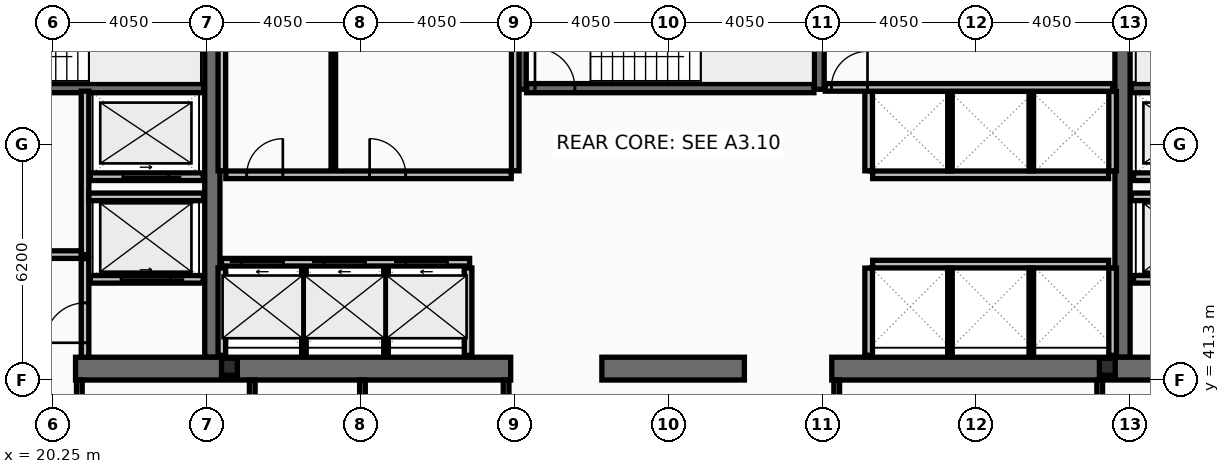
"""IFC4 building model, lengths in metres.
Left out: names, types, materials, properties, quantities, classifications, styles, units other than length and angle.
Written with IfcOpenShell. Run it as: python <this file> out.ifc"""

import sys

from ifc_helpers import new_model, si_unit, direction, frame, frame_2d, origin, origin_2d, place, context, subcontext, project, spatial, rectangle, i_section, extrude, element, fill, save


model = new_model("IFC4")
c1 = context("Model", 3, precision=1e-05, world=origin(), true_north=direction((0.0, 1.0)))
c2 = subcontext(c1, "Body", "Model", "MODEL_VIEW")
j1 = project(units=[si_unit("LENGTHUNIT", "METRE"), si_unit("PLANEANGLEUNIT", "RADIAN")], contexts=[c1])
p1 = place(None, origin())
s1 = spatial("IfcSite", under=j1, at=p1, CompositionType="ELEMENT")
p2 = place(p1, origin())
s2 = spatial("IfcBuilding", under=s1, at=p2, CompositionType="ELEMENT")
p3 = place(p2, frame((0.0, 0.0, 180.6)))
s3 = spatial("IfcBuildingStorey", under=s2, at=p3, CompositionType="ELEMENT", Elevation=180.6)
for number, where, z_axis, x_axis in (
    (1, (24.45, 41.9, 0.0), (0.0, 0.0, 1.0), (0.0, 1.0, 0.0)),
    (2, (48.4, 41.9, 0.0), (0.0, 0.0, 1.0), (0.0, 1.0, 0.0)),
):
    element("IfcWall", number, at=place(p3, frame(where, z_axis=z_axis, x_axis=x_axis)), inside=s3, PredefinedType="SHEAR", context=c2, shape_type="SweptSolid", body=[
        extrude(rectangle(XDim=11.2, YDim=0.4, at=frame_2d((5.6, 0.0))), origin(), (0.0, 0.0, 1.0), 3.4),
    ])
p4 = place(p3, frame((32.3, 41.6, 0.0), z_axis=(0.0, 0.0, 1.0), x_axis=(-1.0, 0.0, 0.0)))
e3 = element("IfcWall", 3, at=p4, inside=s3, PredefinedType="SHEAR", context=c2, shape_type="SweptSolid", body=[
    extrude(rectangle(XDim=11.45, YDim=0.6, at=frame_2d((5.725, 0.0))), origin(), (0.0, 0.0, 1.0), 3.4),
])
p5 = place(p3, frame((38.45, 41.6, 0.0), z_axis=(0.0, 0.0, 1.0), x_axis=(-1.0, 0.0, 0.0)))
e4 = element("IfcWall", 4, at=p5, inside=s3, PredefinedType="SHEAR", context=c2, shape_type="SweptSolid", body=[
    extrude(rectangle(XDim=3.75, YDim=0.6, at=frame_2d((1.875, 0.0))), origin(), (0.0, 0.0, 1.0), 3.4),
])
p6 = place(p3, frame((52.05, 41.6, 0.0), z_axis=(0.0, 0.0, 1.0), x_axis=(-1.0, 0.0, 0.0)))
e5 = element("IfcWall", 5, at=p6, inside=s3, PredefinedType="SHEAR", context=c2, shape_type="SweptSolid", body=[
    extrude(rectangle(XDim=11.3, YDim=0.6, at=frame_2d((5.65, 0.0))), origin(), (0.0, 0.0, 1.0), 3.4),
])
for number, where, z_axis, x_axis in (
    (6, (32.58, 48.95, 0.0), (0.0, 0.0, 1.0), (0.0, 1.0, 0.0)),
    (7, (40.42, 48.95, 0.0), (0.0, 0.0, 1.0), (0.0, 1.0, 0.0)),
):
    element("IfcWall", number, at=place(p3, frame(where, z_axis=z_axis, x_axis=x_axis)), inside=s3, PredefinedType="SHEAR", context=c2, shape_type="SweptSolid", body=[
        extrude(rectangle(XDim=4.15, YDim=0.26, at=frame_2d((2.075, 0.0))), origin(), (0.0, 0.0, 1.0), 3.4),
    ])
p7 = place(p3, frame((16.8, 48.98, 0.0), z_axis=(0.0, 0.0, 1.0), x_axis=(1.0, 0.0, 0.0)))
e8 = element("IfcWall", 8, at=p7, inside=s3, PredefinedType="SHEAR", context=c2, shape_type="SweptSolid", body=[
    extrude(rectangle(XDim=7.42, YDim=0.24, at=frame_2d((3.71, 0.0))), origin(), (0.0, 0.0, 1.0), 3.4),
])
p8 = place(p7, frame((0.22, 0.0, 0.0)))
e9 = element("IfcOpeningElement", 9, at=p8, cuts=e8, PredefinedType="OPENING", context=c2, shape_type="SweptSolid", body=[
    extrude(rectangle(XDim=1.05, YDim=2.15, at=frame_2d((0.525, 1.075))), frame((0.0, 0.13, 0.0), z_axis=(0.0, -1.0, 0.0), x_axis=(1.0, 0.0, 0.0)), (0.0, 0.0, 1.0), 0.26),
])
p9 = place(p3, frame((48.63, 48.98, 0.0), z_axis=(0.0, 0.0, 1.0), x_axis=(1.0, 0.0, 0.0)))
e10 = element("IfcWall", 10, at=p9, inside=s3, PredefinedType="SHEAR", context=c2, shape_type="SweptSolid", body=[
    extrude(rectangle(XDim=7.47, YDim=0.24, at=frame_2d((3.735, 0.0))), origin(), (0.0, 0.0, 1.0), 3.4),
])
p10 = place(p9, frame((6.2, 0.0, 0.0)))
e11 = element("IfcOpeningElement", 11, at=p10, cuts=e10, PredefinedType="OPENING", context=c2, shape_type="SweptSolid", body=[
    extrude(rectangle(XDim=1.05, YDim=2.15, at=frame_2d((0.525, 1.075))), frame((0.0, 0.13, 0.0), z_axis=(0.0, -1.0, 0.0), x_axis=(1.0, 0.0, 0.0)), (0.0, 0.0, 1.0), 0.26),
])
p11 = place(p3, frame((32.72, 48.98, 0.0), z_axis=(0.0, 0.0, 1.0), x_axis=(1.0, 0.0, 0.0)))
e12 = element("IfcWall", 12, at=p11, inside=s3, PredefinedType="SHEAR", context=c2, shape_type="SweptSolid", body=[
    extrude(rectangle(XDim=7.56, YDim=0.24, at=frame_2d((3.78, 0.0))), origin(), (0.0, 0.0, 1.0), 3.4),
])
p12 = place(p11, frame((0.22, 0.0, 0.0)))
e13 = element("IfcOpeningElement", 13, at=p12, cuts=e12, PredefinedType="OPENING", context=c2, shape_type="SweptSolid", body=[
    extrude(rectangle(XDim=1.05, YDim=2.15, at=frame_2d((0.525, 1.075))), frame((0.0, 0.13, 0.0), z_axis=(0.0, -1.0, 0.0), x_axis=(1.0, 0.0, 0.0)), (0.0, 0.0, 1.0), 0.26),
])
for number, where, z_axis, x_axis in (
    (14, (24.9, 41.65, 0.0), (0.0, 0.0, 1.0), (1.0, 0.0, 0.0)),
    (15, (48.0, 41.65, 0.0), (0.0, 0.0, 1.0), (1.0, 0.0, 0.0)),
):
    element("IfcColumn", number, at=place(p3, frame(where, z_axis=z_axis, x_axis=x_axis)), inside=s3, PredefinedType="COLUMN", context=c2, shape_type="SweptSolid", body=[
        extrude(i_section(OverallWidth=0.416, OverallDepth=0.446, WebThickness=0.039, FlangeThickness=0.063, at=origin_2d()), origin(), (0.0, 0.0, 1.0), 3.6),
    ])
p13 = place(p3, frame((24.69, 44.4, 0.0), z_axis=(0.0, 0.0, 1.0), x_axis=(1.0, 0.0, 0.0)))
e16 = element("IfcWall", 16, at=p13, inside=s3, PredefinedType="PARTITIONING", context=c2, shape_type="SweptSolid", body=[
    extrude(rectangle(XDim=6.53, YDim=0.2, at=frame_2d((3.265, 0.0))), origin(), (0.0, 0.0, 1.0), 3.4),
])
p14 = place(p13, frame((0.53, 0.0, 0.0)))
e17 = element("IfcOpeningElement", 17, at=p14, cuts=e16, PredefinedType="OPENING", context=c2, shape_type="SweptSolid", body=[
    extrude(rectangle(XDim=1.1, YDim=2.18, at=frame_2d((0.55, 1.09))), frame((0.0, 0.11, 0.0), z_axis=(0.0, -1.0, 0.0), x_axis=(1.0, 0.0, 0.0)), (0.0, 0.0, 1.0), 0.22),
])
p15 = place(p13, frame((2.69, 0.0, 0.0)))
e18 = element("IfcOpeningElement", 18, at=p15, cuts=e16, PredefinedType="OPENING", context=c2, shape_type="SweptSolid", body=[
    extrude(rectangle(XDim=1.1, YDim=2.18, at=frame_2d((0.55, 1.09))), frame((0.0, 0.11, 0.0), z_axis=(0.0, -1.0, 0.0), x_axis=(1.0, 0.0, 0.0)), (0.0, 0.0, 1.0), 0.22),
])
p16 = place(p13, frame((4.85, 0.0, 0.0)))
e19 = element("IfcOpeningElement", 19, at=p16, cuts=e16, PredefinedType="OPENING", context=c2, shape_type="SweptSolid", body=[
    extrude(rectangle(XDim=1.1, YDim=2.18, at=frame_2d((0.55, 1.09))), frame((0.0, 0.11, 0.0), z_axis=(0.0, -1.0, 0.0), x_axis=(1.0, 0.0, 0.0)), (0.0, 0.0, 1.0), 0.22),
])
p17 = place(p3, frame((51.61, 43.95, 0.0), z_axis=(0.0, 0.0, 1.0), x_axis=(-1.0, 0.0, 0.0)))
e20 = element("IfcWall", 20, at=p17, inside=s3, PredefinedType="PARTITIONING", context=c2, shape_type="SweptSolid", body=[
    extrude(rectangle(XDim=2.92, YDim=0.2, at=frame_2d((1.46, 0.0))), origin(), (0.0, 0.0, 1.0), 3.4),
])
p18 = place(p17, frame((0.81, 0.0, 0.0)))
e21 = element("IfcOpeningElement", 21, at=p18, cuts=e20, PredefinedType="OPENING", context=c2, shape_type="SweptSolid", body=[
    extrude(rectangle(XDim=1.3, YDim=2.18, at=frame_2d((0.65, 1.09))), frame((0.0, 0.11, 0.0), z_axis=(0.0, -1.0, 0.0), x_axis=(1.0, 0.0, 0.0)), (0.0, 0.0, 1.0), 0.22),
])
p19 = place(p3, frame((24.21, 43.95, 0.0), z_axis=(0.0, 0.0, 1.0), x_axis=(-1.0, 0.0, 0.0)))
e22 = element("IfcWall", 22, at=p19, inside=s3, PredefinedType="PARTITIONING", context=c2, shape_type="SweptSolid", body=[
    extrude(rectangle(XDim=2.97, YDim=0.2, at=frame_2d((1.485, 0.0))), origin(), (0.0, 0.0, 1.0), 3.4),
])
p20 = place(p19, frame((0.86, 0.0, 0.0)))
e23 = element("IfcOpeningElement", 23, at=p20, cuts=e22, PredefinedType="OPENING", context=c2, shape_type="SweptSolid", body=[
    extrude(rectangle(XDim=1.3, YDim=2.18, at=frame_2d((0.65, 1.09))), frame((0.0, 0.11, 0.0), z_axis=(0.0, -1.0, 0.0), x_axis=(1.0, 0.0, 0.0)), (0.0, 0.0, 1.0), 0.22),
])
p21 = place(p3, frame((51.61, 46.65, 0.0), z_axis=(0.0, 0.0, 1.0), x_axis=(-1.0, 0.0, 0.0)))
e24 = element("IfcWall", 24, at=p21, inside=s3, PredefinedType="PARTITIONING", context=c2, shape_type="SweptSolid", body=[
    extrude(rectangle(XDim=2.92, YDim=0.2, at=frame_2d((1.46, 0.0))), origin(), (0.0, 0.0, 1.0), 3.4),
])
p22 = place(p21, frame((0.86, 0.0, 0.0)))
e25 = element("IfcOpeningElement", 25, at=p22, cuts=e24, PredefinedType="OPENING", context=c2, shape_type="SweptSolid", body=[
    extrude(rectangle(XDim=1.2, YDim=2.18, at=frame_2d((0.6, 1.09))), frame((0.0, 0.11, 0.0), z_axis=(0.0, -1.0, 0.0), x_axis=(1.0, 0.0, 0.0)), (0.0, 0.0, 1.0), 0.22),
])
p23 = place(p3, frame((24.21, 46.65, 0.0), z_axis=(0.0, 0.0, 1.0), x_axis=(-1.0, 0.0, 0.0)))
e26 = element("IfcWall", 26, at=p23, inside=s3, PredefinedType="PARTITIONING", context=c2, shape_type="SweptSolid", body=[
    extrude(rectangle(XDim=2.97, YDim=0.2, at=frame_2d((1.485, 0.0))), origin(), (0.0, 0.0, 1.0), 3.4),
])
p24 = place(p23, frame((0.91, 0.0, 0.0)))
e27 = element("IfcOpeningElement", 27, at=p24, cuts=e26, PredefinedType="OPENING", context=c2, shape_type="SweptSolid", body=[
    extrude(rectangle(XDim=1.2, YDim=2.18, at=frame_2d((0.6, 1.09))), frame((0.0, 0.11, 0.0), z_axis=(0.0, -1.0, 0.0), x_axis=(1.0, 0.0, 0.0)), (0.0, 0.0, 1.0), 0.22),
])
p25 = place(p3, frame((21.1, 44.6, 0.0), z_axis=(0.0, 0.0, 1.0), x_axis=(0.0, 1.0, 0.0)))
e28 = element("IfcWall", 28, at=p25, inside=s3, PredefinedType="PARTITIONING", context=c2, shape_type="SweptSolid", body=[
    extrude(rectangle(XDim=4.3, YDim=0.2, at=frame_2d((2.15, 0.0))), origin(), (0.0, 0.0, 1.0), 3.4),
])
p26 = place(p3, frame((16.8, 44.6, 0.0), z_axis=(0.0, 0.0, 1.0), x_axis=(1.0, 0.0, 0.0)))
e29 = element("IfcWall", 29, at=p26, inside=s3, PredefinedType="PARTITIONING", context=c2, shape_type="SweptSolid", body=[
    extrude(rectangle(XDim=4.2, YDim=0.2, at=frame_2d((2.1, 0.0))), origin(), (0.0, 0.0, 1.0), 3.4),
])
p27 = place(p26, frame((1.25, 0.0, 0.0)))
e30 = element("IfcOpeningElement", 30, at=p27, cuts=e29, PredefinedType="OPENING", context=c2, shape_type="SweptSolid", body=[
    extrude(rectangle(XDim=1.05, YDim=2.15, at=frame_2d((0.525, 1.075))), frame((0.0, 0.11, 0.0), z_axis=(0.0, -1.0, 0.0), x_axis=(1.0, 0.0, 0.0)), (0.0, 0.0, 1.0), 0.22),
])
p28 = place(p3, frame((21.2, 46.12, 0.0), z_axis=(0.0, 0.0, 1.0), x_axis=(1.0, 0.0, 0.0)))
e31 = element("IfcWall", 31, at=p28, inside=s3, PredefinedType="PARTITIONING", context=c2, shape_type="SweptSolid", body=[
    extrude(rectangle(XDim=3.02, YDim=0.2, at=frame_2d((1.51, 0.0))), origin(), (0.0, 0.0, 1.0), 3.4),
])
p29 = place(p3, frame((21.1, 41.9, 0.0), z_axis=(0.0, 0.0, 1.0), x_axis=(0.0, 1.0, 0.0)))
e32 = element("IfcWall", 32, at=p29, inside=s3, PredefinedType="PARTITIONING", context=c2, shape_type="SweptSolid", body=[
    extrude(rectangle(XDim=2.595, YDim=0.2, at=frame_2d((1.298, 0.0))), origin(), (0.0, 0.0, 1.0), 3.4),
])
p30 = place(p29, frame((0.38, 0.0, 0.0)))
e33 = element("IfcOpeningElement", 33, at=p30, cuts=e32, PredefinedType="OPENING", context=c2, shape_type="SweptSolid", body=[
    extrude(rectangle(XDim=1.05, YDim=2.15, at=frame_2d((0.525, 1.075))), frame((0.0, 0.11, 0.0), z_axis=(0.0, -1.0, 0.0), x_axis=(1.0, 0.0, 0.0)), (0.0, 0.0, 1.0), 0.22),
])
p31 = place(p3, frame((48.63, 46.12, 0.0), z_axis=(0.0, 0.0, 1.0), x_axis=(1.0, 0.0, 0.0)))
e34 = element("IfcWall", 34, at=p31, inside=s3, PredefinedType="PARTITIONING", context=c2, shape_type="SweptSolid", body=[
    extrude(rectangle(XDim=3.07, YDim=0.2, at=frame_2d((1.535, 0.0))), origin(), (0.0, 0.0, 1.0), 3.4),
])
for number, where, z_axis, x_axis in (
    (35, (24.7, 46.805, 0.0), (0.0, 0.0, 1.0), (0.0, 1.0, 0.0)),
    (36, (32.42, 46.805, 0.0), (0.0, 0.0, 1.0), (0.0, 1.0, 0.0)),
):
    element("IfcWall", number, at=place(p3, frame(where, z_axis=z_axis, x_axis=x_axis)), inside=s3, PredefinedType="PARTITIONING", context=c2, shape_type="SweptSolid", body=[
        extrude(rectangle(XDim=5.99, YDim=0.2, at=frame_2d((2.995, 0.0))), origin(), (0.0, 0.0, 1.0), 3.4),
    ])
p32 = place(p3, frame((27.634, 46.805, 0.0), z_axis=(0.0, 0.0, 1.0), x_axis=(0.0, 1.0, 0.0)))
e37 = element("IfcWall", 37, at=p32, inside=s3, PredefinedType="PARTITIONING", context=c2, shape_type="SweptSolid", body=[
    extrude(rectangle(XDim=5.99, YDim=0.12, at=frame_2d((2.995, 0.0))), origin(), (0.0, 0.0, 1.0), 3.4),
])
p33 = place(p3, frame((24.805, 46.7, 0.0), z_axis=(0.0, 0.0, 1.0), x_axis=(1.0, 0.0, 0.0)))
e38 = element("IfcWall", 38, at=p33, inside=s3, PredefinedType="PARTITIONING", context=c2, shape_type="SweptSolid", body=[
    extrude(rectangle(XDim=7.51, YDim=0.2, at=frame_2d((3.755, 0.0))), origin(), (0.0, 0.0, 1.0), 3.4),
])
p34 = place(p33, frame((0.55, 0.0, 0.0)))
e39 = element("IfcOpeningElement", 39, at=p34, cuts=e38, PredefinedType="OPENING", context=c2, shape_type="SweptSolid", body=[
    extrude(rectangle(XDim=0.95, YDim=2.1, at=frame_2d((0.475, 1.05))), frame((0.0, 0.11, 0.0), z_axis=(0.0, -1.0, 0.0), x_axis=(1.0, 0.0, 0.0)), (0.0, 0.0, 1.0), 0.22),
])
p35 = place(p33, frame((3.784, 0.0, 0.0)))
e40 = element("IfcOpeningElement", 40, at=p35, cuts=e38, PredefinedType="OPENING", context=c2, shape_type="SweptSolid", body=[
    extrude(rectangle(XDim=0.95, YDim=2.1, at=frame_2d((0.475, 1.05))), frame((0.0, 0.11, 0.0), z_axis=(0.0, -1.0, 0.0), x_axis=(1.0, 0.0, 0.0)), (0.0, 0.0, 1.0), 0.22),
])
for number, where, z_axis, x_axis in (
    (41, (24.7, 41.95, 0.0), (0.0, 0.0, 1.0), (0.0, 1.0, 0.0)),
    (42, (31.18, 41.95, 0.0), (0.0, 0.0, 1.0), (0.0, 1.0, 0.0)),
):
    element("IfcWall", number, at=place(p3, frame(where, z_axis=z_axis, x_axis=x_axis)), inside=s3, PredefinedType="PARTITIONING", context=c2, shape_type="SweptSolid", body=[
        extrude(rectangle(XDim=2.3, YDim=0.2, at=frame_2d((1.15, 0.0))), origin(), (0.0, 0.0, 1.0), 3.4),
    ])
for number, where, z_axis, x_axis in (
    (43, (26.86, 41.95, 0.0), (0.0, 0.0, 1.0), (0.0, 1.0, 0.0)),
    (44, (29.02, 41.95, 0.0), (0.0, 0.0, 1.0), (0.0, 1.0, 0.0)),
):
    element("IfcWall", number, at=place(p3, frame(where, z_axis=z_axis, x_axis=x_axis)), inside=s3, PredefinedType="PARTITIONING", context=c2, shape_type="SweptSolid", body=[
        extrude(rectangle(XDim=2.3, YDim=0.12, at=frame_2d((1.15, 0.0))), origin(), (0.0, 0.0, 1.0), 3.4),
    ])
p36 = place(p3, frame((41.825, 46.7, 0.0), z_axis=(0.0, 0.0, 1.0), x_axis=(1.0, 0.0, 0.0)))
e45 = element("IfcWall", 45, at=p36, inside=s3, PredefinedType="PARTITIONING", context=c2, shape_type="SweptSolid", body=[
    extrude(rectangle(XDim=6.21, YDim=0.2, at=frame_2d((3.105, 0.0))), origin(), (0.0, 0.0, 1.0), 3.4),
])
for number, where, z_axis, x_axis in (
    (46, (41.72, 46.805, 0.0), (0.0, 0.0, 1.0), (0.0, 1.0, 0.0)),
    (47, (48.14, 46.805, 0.0), (0.0, 0.0, 1.0), (0.0, 1.0, 0.0)),
):
    element("IfcWall", number, at=place(p3, frame(where, z_axis=z_axis, x_axis=x_axis)), inside=s3, PredefinedType="PARTITIONING", context=c2, shape_type="SweptSolid", body=[
        extrude(rectangle(XDim=2.09, YDim=0.2, at=frame_2d((1.045, 0.0))), origin(), (0.0, 0.0, 1.0), 3.4),
    ])
for number, where, z_axis, x_axis in (
    (48, (43.86, 46.805, 0.0), (0.0, 0.0, 1.0), (0.0, 1.0, 0.0)),
    (49, (46.0, 46.805, 0.0), (0.0, 0.0, 1.0), (0.0, 1.0, 0.0)),
):
    element("IfcWall", number, at=place(p3, frame(where, z_axis=z_axis, x_axis=x_axis)), inside=s3, PredefinedType="PARTITIONING", context=c2, shape_type="SweptSolid", body=[
        extrude(rectangle(XDim=2.09, YDim=0.12, at=frame_2d((1.045, 0.0))), origin(), (0.0, 0.0, 1.0), 3.4),
    ])
p37 = place(p3, frame((41.825, 44.35, 0.0), z_axis=(0.0, 0.0, 1.0), x_axis=(1.0, 0.0, 0.0)))
e50 = element("IfcWall", 50, at=p37, inside=s3, PredefinedType="PARTITIONING", context=c2, shape_type="SweptSolid", body=[
    extrude(rectangle(XDim=6.21, YDim=0.2, at=frame_2d((3.105, 0.0))), origin(), (0.0, 0.0, 1.0), 3.4),
])
for number, where, z_axis, x_axis in (
    (51, (41.72, 41.95, 0.0), (0.0, 0.0, 1.0), (0.0, 1.0, 0.0)),
    (52, (48.14, 41.95, 0.0), (0.0, 0.0, 1.0), (0.0, 1.0, 0.0)),
):
    element("IfcWall", number, at=place(p3, frame(where, z_axis=z_axis, x_axis=x_axis)), inside=s3, PredefinedType="PARTITIONING", context=c2, shape_type="SweptSolid", body=[
        extrude(rectangle(XDim=2.295, YDim=0.2, at=frame_2d((1.147, 0.0))), origin(), (0.0, 0.0, 1.0), 3.4),
    ])
for number, where, z_axis, x_axis in (
    (53, (43.86, 41.95, 0.0), (0.0, 0.0, 1.0), (0.0, 1.0, 0.0)),
    (54, (46.0, 41.95, 0.0), (0.0, 0.0, 1.0), (0.0, 1.0, 0.0)),
):
    element("IfcWall", number, at=place(p3, frame(where, z_axis=z_axis, x_axis=x_axis)), inside=s3, PredefinedType="PARTITIONING", context=c2, shape_type="SweptSolid", body=[
        extrude(rectangle(XDim=2.295, YDim=0.12, at=frame_2d((1.147, 0.0))), origin(), (0.0, 0.0, 1.0), 3.4),
    ])
p38 = place(p3, frame((40.58, 49.0, 0.0), z_axis=(0.0, 0.0, 1.0), x_axis=(1.0, 0.0, 0.0)))
e55 = element("IfcWall", 55, at=p38, inside=s3, PredefinedType="PARTITIONING", context=c2, shape_type="SweptSolid", body=[
    extrude(rectangle(XDim=7.56, YDim=0.2, at=frame_2d((3.78, 0.0))), origin(), (0.0, 0.0, 1.0), 3.4),
])
p39 = place(p38, frame((0.16, 0.0, 0.0)))
e56 = element("IfcOpeningElement", 56, at=p39, cuts=e55, PredefinedType="OPENING", context=c2, shape_type="SweptSolid", body=[
    extrude(rectangle(XDim=0.95, YDim=2.1, at=frame_2d((0.475, 1.05))), frame((0.0, 0.11, 0.0), z_axis=(0.0, -1.0, 0.0), x_axis=(1.0, 0.0, 0.0)), (0.0, 0.0, 1.0), 0.22),
])
for number, where, z_axis, x_axis in (
    (57, (20.95, 38.28, 0.0), (0.0, 0.0, 1.0), (0.0, 1.0, 0.0)),
    (58, (25.5, 38.28, 0.0), (0.0, 0.0, 1.0), (0.0, 1.0, 0.0)),
    (59, (28.4, 38.28, 0.0), (0.0, 0.0, 1.0), (0.0, 1.0, 0.0)),
    (60, (32.18, 38.28, 0.0), (0.0, 0.0, 1.0), (0.0, 1.0, 0.0)),
    (61, (40.88, 38.28, 0.0), (0.0, 0.0, 1.0), (0.0, 1.0, 0.0)),
):
    element("IfcWall", number, at=place(p3, frame(where, z_axis=z_axis, x_axis=x_axis)), inside=s3, PredefinedType="PARTITIONING", context=c2, shape_type="SweptSolid", body=[
        extrude(rectangle(XDim=3.02, YDim=0.15, at=frame_2d((1.51, 0.0))), origin(), (0.0, 0.0, 1.0), 3.4),
    ])
p40 = place(p3, frame((47.8, 38.28, 0.0), z_axis=(0.0, 0.0, 1.0), x_axis=(0.0, 1.0, 0.0)))
e62 = element("IfcWall", 62, at=p40, inside=s3, PredefinedType="PARTITIONING", context=c2, shape_type="SweptSolid", body=[
    extrude(rectangle(XDim=3.02, YDim=0.15, at=frame_2d((1.51, 0.0))), origin(), (0.0, 0.0, 1.0), 2.69),
])
p41 = place(p12, origin())
e63 = element("IfcDoor", 63, at=p41, inside=s3, OperationType="SINGLE_SWING_LEFT", PredefinedType="DOOR", context=c2, shape_type="SweptSolid", body=[
    extrude(rectangle(XDim=1.05, YDim=2.15, at=frame_2d((0.525, 1.075))), frame((0.0, 0.025, 0.0), z_axis=(0.0, -1.0, 0.0), x_axis=(1.0, 0.0, 0.0)), (0.0, 0.0, 1.0), 0.05),
])
fill(e13, e63)
p42 = place(p14, origin())
e64 = element("IfcDoor", 64, at=p42, inside=s3, OperationType="SLIDING_TO_LEFT", PredefinedType="DOOR", context=c2, shape_type="SweptSolid", body=[
    extrude(rectangle(XDim=1.1, YDim=2.18, at=frame_2d((0.55, 1.09))), frame((0.0, 0.025, 0.0), z_axis=(0.0, -1.0, 0.0), x_axis=(1.0, 0.0, 0.0)), (0.0, 0.0, 1.0), 0.05),
])
fill(e17, e64)
p43 = place(p15, origin())
e65 = element("IfcDoor", 65, at=p43, inside=s3, OperationType="SLIDING_TO_LEFT", PredefinedType="DOOR", context=c2, shape_type="SweptSolid", body=[
    extrude(rectangle(XDim=1.1, YDim=2.18, at=frame_2d((0.55, 1.09))), frame((0.0, 0.025, 0.0), z_axis=(0.0, -1.0, 0.0), x_axis=(1.0, 0.0, 0.0)), (0.0, 0.0, 1.0), 0.05),
])
fill(e18, e65)
p44 = place(p16, origin())
e66 = element("IfcDoor", 66, at=p44, inside=s3, OperationType="SLIDING_TO_LEFT", PredefinedType="DOOR", context=c2, shape_type="SweptSolid", body=[
    extrude(rectangle(XDim=1.1, YDim=2.18, at=frame_2d((0.55, 1.09))), frame((0.0, 0.025, 0.0), z_axis=(0.0, -1.0, 0.0), x_axis=(1.0, 0.0, 0.0)), (0.0, 0.0, 1.0), 0.05),
])
fill(e19, e66)
p45 = place(p20, origin())
e67 = element("IfcDoor", 67, at=p45, inside=s3, OperationType="SLIDING_TO_LEFT", PredefinedType="DOOR", context=c2, shape_type="SweptSolid", body=[
    extrude(rectangle(XDim=1.3, YDim=2.18, at=frame_2d((0.65, 1.09))), frame((0.0, 0.025, 0.0), z_axis=(0.0, -1.0, 0.0), x_axis=(1.0, 0.0, 0.0)), (0.0, 0.0, 1.0), 0.05),
])
fill(e23, e67)
p46 = place(p24, origin())
e68 = element("IfcDoor", 68, at=p46, inside=s3, OperationType="SLIDING_TO_LEFT", PredefinedType="DOOR", context=c2, shape_type="SweptSolid", body=[
    extrude(rectangle(XDim=1.2, YDim=2.18, at=frame_2d((0.6, 1.09))), frame((0.0, 0.025, 0.0), z_axis=(0.0, -1.0, 0.0), x_axis=(1.0, 0.0, 0.0)), (0.0, 0.0, 1.0), 0.05),
])
fill(e27, e68)
p47 = place(p30, origin())
e69 = element("IfcDoor", 69, at=p47, inside=s3, OperationType="SINGLE_SWING_LEFT", PredefinedType="DOOR", context=c2, shape_type="SweptSolid", body=[
    extrude(rectangle(XDim=1.05, YDim=2.15, at=frame_2d((0.525, 1.075))), frame((0.0, 0.025, 0.0), z_axis=(0.0, -1.0, 0.0), x_axis=(1.0, 0.0, 0.0)), (0.0, 0.0, 1.0), 0.05),
])
fill(e33, e69)
p48 = place(p34, origin())
e70 = element("IfcDoor", 70, at=p48, inside=s3, OperationType="SINGLE_SWING_RIGHT", PredefinedType="DOOR", context=c2, shape_type="SweptSolid", body=[
    extrude(rectangle(XDim=0.95, YDim=2.1, at=frame_2d((0.475, 1.05))), frame((0.0, 0.025, 0.0), z_axis=(0.0, -1.0, 0.0), x_axis=(1.0, 0.0, 0.0)), (0.0, 0.0, 1.0), 0.05),
])
fill(e39, e70)
p49 = place(p35, origin())
e71 = element("IfcDoor", 71, at=p49, inside=s3, OperationType="SINGLE_SWING_LEFT", PredefinedType="DOOR", context=c2, shape_type="SweptSolid", body=[
    extrude(rectangle(XDim=0.95, YDim=2.1, at=frame_2d((0.475, 1.05))), frame((0.0, 0.025, 0.0), z_axis=(0.0, -1.0, 0.0), x_axis=(1.0, 0.0, 0.0)), (0.0, 0.0, 1.0), 0.05),
])
fill(e40, e71)
p50 = place(p39, origin())
e72 = element("IfcDoor", 72, at=p50, inside=s3, OperationType="SINGLE_SWING_RIGHT", PredefinedType="DOOR", context=c2, shape_type="SweptSolid", body=[
    extrude(rectangle(XDim=0.95, YDim=2.1, at=frame_2d((0.475, 1.05))), frame((0.0, 0.025, 0.0), z_axis=(0.0, -1.0, 0.0), x_axis=(1.0, 0.0, 0.0)), (0.0, 0.0, 1.0), 0.05),
])
fill(e56, e72)
save(model, sys.argv[1])
